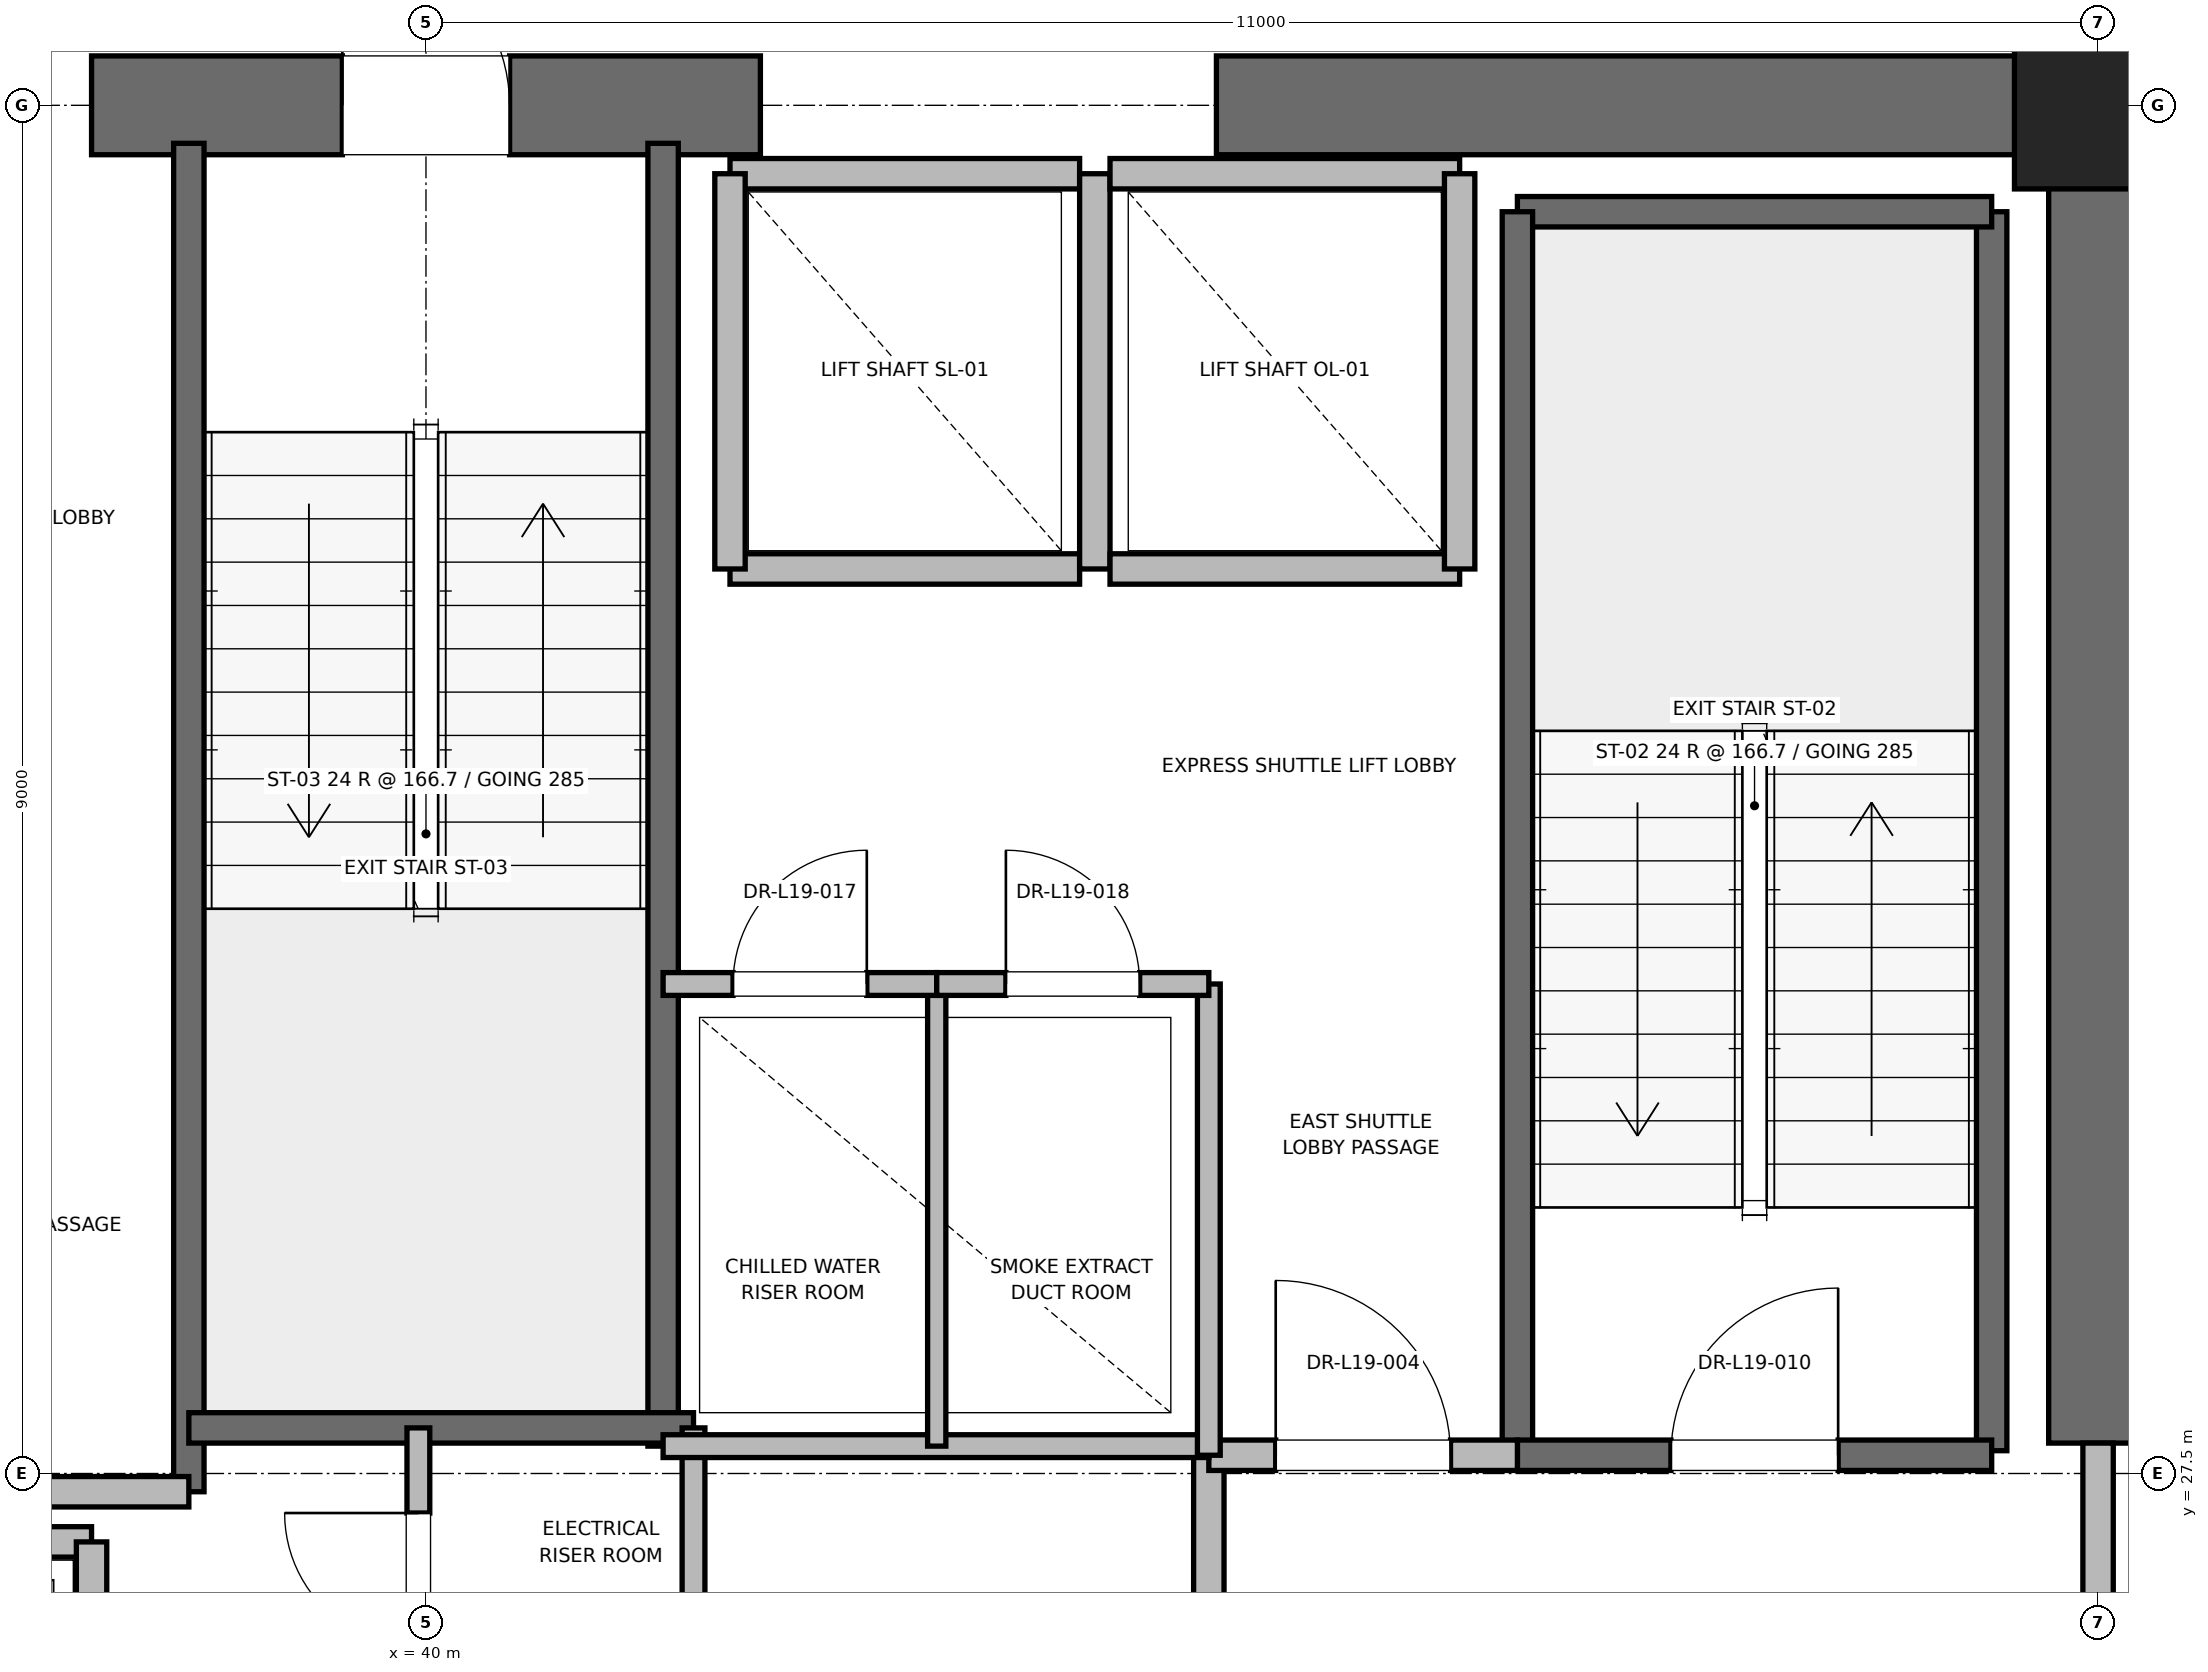
"""IFC4 building model, lengths in metres.
Left out: names, types, materials, properties, quantities, classifications, styles, units other than length and angle.
Written with IfcOpenShell. Run it as: python <this file> out.ifc"""

import sys

from ifc_helpers import new_model, si_unit, direction, frame, frame_2d, origin, origin_2d, place, context, subcontext, project, spatial, rectangle, extrude, element, fill, save


model = new_model("IFC4")
c1 = context("Model", 3, precision=1e-05, world=origin(), true_north=direction((0.0, 1.0)))
c2 = subcontext(c1, "Body", "Model", "MODEL_VIEW")
j1 = project(units=[si_unit("LENGTHUNIT", "METRE"), si_unit("PLANEANGLEUNIT", "RADIAN")], contexts=[c1])
p1 = place(None, origin())
s1 = spatial("IfcSite", under=j1, at=p1, CompositionType="ELEMENT")
p2 = place(p1, origin())
s2 = spatial("IfcBuilding", under=s1, at=p2, CompositionType="ELEMENT")
p3 = place(p2, frame((0.0, 0.0, 83.6)))
s3 = spatial("IfcBuildingStorey", under=s2, at=p3, CompositionType="ELEMENT", Elevation=83.6)
p4 = place(p3, frame((51.0, 36.5, 0.0), z_axis=(0.0, 0.0, 1.0), x_axis=(1.0, 0.0, 0.0)))
e1 = element("IfcColumn", 1, at=p4, inside=s3, PredefinedType="PILASTER", context=c2, shape_type="SweptSolid", body=[
    extrude(rectangle(XDim=1.1, YDim=1.1, at=origin_2d()), origin(), (0.0, 0.0, 1.0), 4.0),
])
p5 = place(p3, frame((37.8, 36.5, 0.0), z_axis=(0.0, 0.0, 1.0), x_axis=(1.0, 0.0, 0.0)))
e2 = element("IfcWall", 2, at=p5, inside=s3, PredefinedType="SHEAR", context=c2, shape_type="SweptSolid", body=[
    extrude(rectangle(XDim=4.4, YDim=0.65, at=frame_2d((2.2, 0.0))), origin(), (0.0, 0.0, 1.0), 3.76),
])
p6 = place(p5, frame((1.65, 0.0, 0.0)))
e3 = element("IfcOpeningElement", 3, at=p6, cuts=e2, PredefinedType="OPENING", context=c2, shape_type="SweptSolid", body=[
    extrude(rectangle(XDim=1.1, YDim=2.15, at=frame_2d((0.55, 1.075))), frame((0.0, 0.325, 0.0), z_axis=(0.0, -1.0, 0.0), x_axis=(1.0, 0.0, 0.0)), (0.0, 0.0, 1.0), 0.65),
])
p7 = place(p3, frame((45.2, 36.5, 0.0), z_axis=(0.0, 0.0, 1.0), x_axis=(1.0, 0.0, 0.0)))
e4 = element("IfcWall", 4, at=p7, inside=s3, PredefinedType="SHEAR", context=c2, shape_type="SweptSolid", body=[
    extrude(rectangle(XDim=5.8, YDim=0.65, at=frame_2d((2.9, 0.0))), origin(), (0.0, 0.0, 1.0), 3.76),
])
p8 = place(p3, frame((51.0, 27.7, 0.0), z_axis=(0.0, 0.0, 1.0), x_axis=(0.0, 1.0, 0.0)))
e5 = element("IfcWall", 5, at=p8, inside=s3, PredefinedType="SHEAR", context=c2, shape_type="SweptSolid", body=[
    extrude(rectangle(XDim=8.8, YDim=0.65, at=frame_2d((4.4, 0.0))), origin(), (0.0, 0.0, 1.0), 3.76),
])
p9 = place(p3, frame((50.3, 27.65, 0.0), z_axis=(0.0, 0.0, 1.0), x_axis=(0.0, 1.0, 0.0)))
e6 = element("IfcWall", 6, at=p9, inside=s3, PredefinedType="SOLIDWALL", context=c2, shape_type="SweptSolid", body=[
    extrude(rectangle(XDim=8.15, YDim=0.2, at=frame_2d((4.075, 0.0))), origin(), (0.0, 0.0, 1.0), 3.76),
])
p10 = place(p3, frame((47.18, 35.8, 0.0), z_axis=(0.0, 0.0, 1.0), x_axis=(1.0, 0.0, 0.0)))
e7 = element("IfcWall", 7, at=p10, inside=s3, PredefinedType="SOLIDWALL", context=c2, shape_type="SweptSolid", body=[
    extrude(rectangle(XDim=3.12, YDim=0.2, at=frame_2d((1.56, 0.0))), origin(), (0.0, 0.0, 1.0), 3.76),
])
p11 = place(p3, frame((47.18, 27.62, 0.0), z_axis=(0.0, 0.0, 1.0), x_axis=(0.0, 1.0, 0.0)))
e8 = element("IfcWall", 8, at=p11, inside=s3, PredefinedType="SOLIDWALL", context=c2, shape_type="SweptSolid", body=[
    extrude(rectangle(XDim=8.18, YDim=0.2, at=frame_2d((4.09, 0.0))), origin(), (0.0, 0.0, 1.0), 3.76),
])
p12 = place(p3, frame((47.18, 27.62, 0.0), z_axis=(0.0, 0.0, 1.0), x_axis=(1.0, 0.0, 0.0)))
e9 = element("IfcWall", 9, at=p12, inside=s3, PredefinedType="SOLIDWALL", context=c2, shape_type="SweptSolid", body=[
    extrude(rectangle(XDim=3.12, YDim=0.2, at=frame_2d((1.56, 0.0))), origin(), (0.0, 0.0, 1.0), 3.76),
])
p13 = place(p12, frame((1.01, 0.0, 0.0)))
e10 = element("IfcOpeningElement", 10, at=p13, cuts=e9, PredefinedType="OPENING", context=c2, shape_type="SweptSolid", body=[
    extrude(rectangle(XDim=1.1, YDim=2.15, at=frame_2d((0.55, 1.075))), frame((0.0, 0.1, 0.0), z_axis=(0.0, -1.0, 0.0), x_axis=(1.0, 0.0, 0.0)), (0.0, 0.0, 1.0), 0.2),
])
p14 = place(p3, frame((38.44, 27.38, 0.0), z_axis=(0.0, 0.0, 1.0), x_axis=(0.0, 1.0, 0.0)))
e11 = element("IfcWall", 11, at=p14, inside=s3, PredefinedType="SOLIDWALL", context=c2, shape_type="SweptSolid", body=[
    extrude(rectangle(XDim=8.87, YDim=0.2, at=frame_2d((4.435, 0.0))), origin(), (0.0, 0.0, 1.0), 3.76),
])
p15 = place(p3, frame((41.56, 27.68, 0.0), z_axis=(0.0, 0.0, 1.0), x_axis=(0.0, 1.0, 0.0)))
e12 = element("IfcWall", 12, at=p15, inside=s3, PredefinedType="SOLIDWALL", context=c2, shape_type="SweptSolid", body=[
    extrude(rectangle(XDim=8.57, YDim=0.2, at=frame_2d((4.285, 0.0))), origin(), (0.0, 0.0, 1.0), 3.76),
])
p16 = place(p3, frame((38.44, 27.8, 0.0), z_axis=(0.0, 0.0, 1.0), x_axis=(1.0, 0.0, 0.0)))
e13 = element("IfcWall", 13, at=p16, inside=s3, PredefinedType="SOLIDWALL", context=c2, shape_type="SweptSolid", body=[
    extrude(rectangle(XDim=3.32, YDim=0.2, at=frame_2d((1.66, 0.0))), origin(), (0.0, 0.0, 1.0), 3.76),
])
p17 = place(p3, frame((32.82, 27.38, 0.0), z_axis=(0.0, 0.0, 1.0), x_axis=(1.0, 0.0, 0.0)))
e14 = element("IfcWall", 14, at=p17, inside=s3, PredefinedType="PARTITIONING", context=c2, shape_type="SweptSolid", body=[
    extrude(rectangle(XDim=5.62, YDim=0.2, at=frame_2d((2.81, 0.0))), origin(), (0.0, 0.0, 1.0), 3.76),
])
p18 = place(p3, frame((45.15, 24.25, 0.0), z_axis=(0.0, 0.0, 1.0), x_axis=(0.0, 1.0, 0.0)))
e15 = element("IfcWall", 15, at=p18, inside=s3, PredefinedType="PARTITIONING", context=c2, shape_type="SweptSolid", body=[
    extrude(rectangle(XDim=3.37, YDim=0.2, at=frame_2d((1.685, 0.0))), origin(), (0.0, 0.0, 1.0), 3.76),
])
p19 = place(p3, frame((45.15, 27.62, 0.0), z_axis=(0.0, 0.0, 1.0), x_axis=(1.0, 0.0, 0.0)))
e16 = element("IfcWall", 16, at=p19, inside=s3, PredefinedType="PARTITIONING", context=c2, shape_type="SweptSolid", body=[
    extrude(rectangle(XDim=2.03, YDim=0.2, at=frame_2d((1.015, 0.0))), origin(), (0.0, 0.0, 1.0), 3.76),
])
p20 = place(p19, frame((0.44, 0.0, 0.0)))
e17 = element("IfcOpeningElement", 17, at=p20, cuts=e16, PredefinedType="OPENING", context=c2, shape_type="SweptSolid", body=[
    extrude(rectangle(XDim=1.15, YDim=2.2, at=frame_2d((0.575, 1.1))), frame((0.0, 0.1, 0.0), z_axis=(0.0, -1.0, 0.0), x_axis=(1.0, 0.0, 0.0)), (0.0, 0.0, 1.0), 0.2),
])
p21 = place(p3, frame((51.0, 24.3, 0.0), z_axis=(0.0, 0.0, 1.0), x_axis=(0.0, 1.0, 0.0)))
e18 = element("IfcWall", 18, at=p21, inside=s3, PredefinedType="PARTITIONING", context=c2, shape_type="SweptSolid", body=[
    extrude(rectangle(XDim=3.4, YDim=0.2, at=frame_2d((1.7, 0.0))), origin(), (0.0, 0.0, 1.0), 2.54),
])
p22 = place(p21, frame((1.125, 0.0, 0.0)))
e19 = element("IfcOpeningElement", 19, at=p22, cuts=e18, PredefinedType="OPENING", context=c2, shape_type="SweptSolid", body=[
    extrude(rectangle(XDim=1.15, YDim=2.2, at=frame_2d((0.575, 1.1))), frame((0.0, 0.1, 0.0), z_axis=(0.0, -1.0, 0.0), x_axis=(1.0, 0.0, 0.0)), (0.0, 0.0, 1.0), 0.2),
])
p23 = place(p3, frame((37.8, 27.05, 0.0), z_axis=(0.0, 0.0, 1.0), x_axis=(-1.0, 0.0, 0.0)))
e20 = element("IfcWall", 20, at=p23, inside=s3, PredefinedType="SOLIDWALL", context=c2, shape_type="SweptSolid", body=[
    extrude(rectangle(XDim=2.3, YDim=0.2, at=frame_2d((1.15, 0.0))), origin(), (0.0, 0.0, 1.0), 3.76),
])
p24 = place(p3, frame((37.8, 24.45, 0.0), z_axis=(0.0, 0.0, 1.0), x_axis=(0.0, 1.0, 0.0)))
e21 = element("IfcWall", 21, at=p24, inside=s3, PredefinedType="SOLIDWALL", context=c2, shape_type="SweptSolid", body=[
    extrude(rectangle(XDim=2.6, YDim=0.2, at=frame_2d((1.3, 0.0))), origin(), (0.0, 0.0, 1.0), 3.76),
])
p25 = place(p3, frame((42.0, 33.45, 0.0), z_axis=(0.0, 0.0, 1.0), x_axis=(1.0, 0.0, 0.0)))
e22 = element("IfcWall", 22, at=p25, inside=s3, PredefinedType="SOLIDWALL", context=c2, shape_type="SweptSolid", body=[
    extrude(rectangle(XDim=2.3, YDim=0.2, at=frame_2d((1.15, 0.0))), origin(), (0.0, 0.0, 1.0), 3.76),
])
p26 = place(p3, frame((44.3, 36.05, 0.0), z_axis=(0.0, 0.0, 1.0), x_axis=(-1.0, 0.0, 0.0)))
e23 = element("IfcWall", 23, at=p26, inside=s3, PredefinedType="SOLIDWALL", context=c2, shape_type="SweptSolid", body=[
    extrude(rectangle(XDim=2.3, YDim=0.2, at=frame_2d((1.15, 0.0))), origin(), (0.0, 0.0, 1.0), 2.54),
])
for number, where, z_axis, x_axis in (
    (24, (42.0, 36.05, 0.0), (0.0, 0.0, 1.0), (0.0, -1.0, 0.0)),
    (25, (44.4, 33.45, 0.0), (0.0, 0.0, 1.0), (0.0, 1.0, 0.0)),
):
    element("IfcWall", number, at=place(p3, frame(where, z_axis=z_axis, x_axis=x_axis)), inside=s3, PredefinedType="SOLIDWALL", context=c2, shape_type="SweptSolid", body=[
        extrude(rectangle(XDim=2.6, YDim=0.2, at=frame_2d((1.3, 0.0))), origin(), (0.0, 0.0, 1.0), 2.54),
    ])
p27 = place(p3, frame((44.5, 33.45, 0.0), z_axis=(0.0, 0.0, 1.0), x_axis=(1.0, 0.0, 0.0)))
e26 = element("IfcWall", 26, at=p27, inside=s3, PredefinedType="SOLIDWALL", context=c2, shape_type="SweptSolid", body=[
    extrude(rectangle(XDim=2.3, YDim=0.2, at=frame_2d((1.15, 0.0))), origin(), (0.0, 0.0, 1.0), 3.76),
])
p28 = place(p3, frame((46.8, 36.05, 0.0), z_axis=(0.0, 0.0, 1.0), x_axis=(-1.0, 0.0, 0.0)))
e27 = element("IfcWall", 27, at=p28, inside=s3, PredefinedType="SOLIDWALL", context=c2, shape_type="SweptSolid", body=[
    extrude(rectangle(XDim=2.3, YDim=0.2, at=frame_2d((1.15, 0.0))), origin(), (0.0, 0.0, 1.0), 2.54),
])
p29 = place(p3, frame((46.8, 33.45, 0.0), z_axis=(0.0, 0.0, 1.0), x_axis=(0.0, 1.0, 0.0)))
e28 = element("IfcWall", 28, at=p29, inside=s3, PredefinedType="SOLIDWALL", context=c2, shape_type="SweptSolid", body=[
    extrude(rectangle(XDim=2.6, YDim=0.2, at=frame_2d((1.3, 0.0))), origin(), (0.0, 0.0, 1.0), 3.76),
])
p30 = place(p3, frame((41.76, 23.8, 0.0), z_axis=(0.0, 0.0, 1.0), x_axis=(0.0, 1.0, 0.0)))
e29 = element("IfcWall", 29, at=p30, inside=s3, PredefinedType="PARTITIONING", context=c2, shape_type="SweptSolid", body=[
    extrude(rectangle(XDim=4.0, YDim=0.15, at=frame_2d((2.0, 0.0))), origin(), (0.0, 0.0, 1.0), 2.85),
])
p31 = place(p3, frame((39.95, 25.8, 0.0), z_axis=(0.0, 0.0, 1.0), x_axis=(0.0, 1.0, 0.0)))
e30 = element("IfcWall", 30, at=p31, inside=s3, PredefinedType="PARTITIONING", context=c2, shape_type="SweptSolid", body=[
    extrude(rectangle(XDim=2.0, YDim=0.15, at=frame_2d((1.0, 0.0))), origin(), (0.0, 0.0, 1.0), 2.85),
])
p32 = place(p31, frame((0.56, 0.0, 0.0)))
e31 = element("IfcOpeningElement", 31, at=p32, cuts=e30, PredefinedType="OPENING", context=c2, shape_type="SweptSolid", body=[
    extrude(rectangle(XDim=0.88, YDim=2.1, at=frame_2d((0.44, 1.05))), frame((0.0, 0.075, 0.0), z_axis=(0.0, -1.0, 0.0), x_axis=(1.0, 0.0, 0.0)), (0.0, 0.0, 1.0), 0.15),
])
p33 = place(p3, frame((41.56, 27.68, 0.0), z_axis=(0.0, 0.0, 1.0), x_axis=(1.0, 0.0, 0.0)))
e32 = element("IfcWall", 32, at=p33, inside=s3, PredefinedType="PARTITIONING", context=c2, shape_type="SweptSolid", body=[
    extrude(rectangle(XDim=3.59, YDim=0.15, at=frame_2d((1.795, 0.0))), origin(), (0.0, 0.0, 1.0), 2.85),
])
p34 = place(p3, frame((45.15, 27.62, 0.0), z_axis=(0.0, 0.0, 1.0), x_axis=(0.0, 1.0, 0.0)))
e33 = element("IfcWall", 33, at=p34, inside=s3, PredefinedType="PARTITIONING", context=c2, shape_type="SweptSolid", body=[
    extrude(rectangle(XDim=3.1, YDim=0.15, at=frame_2d((1.55, 0.0))), origin(), (0.0, 0.0, 1.0), 2.85),
])
p35 = place(p3, frame((43.36, 27.68, 0.0), z_axis=(0.0, 0.0, 1.0), x_axis=(0.0, 1.0, 0.0)))
e34 = element("IfcWall", 34, at=p35, inside=s3, PredefinedType="PARTITIONING", context=c2, shape_type="SweptSolid", body=[
    extrude(rectangle(XDim=3.04, YDim=0.12, at=frame_2d((1.52, 0.0))), origin(), (0.0, 0.0, 1.0), 2.85),
])
p36 = place(p3, frame((41.56, 30.72, 0.0), z_axis=(0.0, 0.0, 1.0), x_axis=(1.0, 0.0, 0.0)))
e35 = element("IfcWall", 35, at=p36, inside=s3, PredefinedType="PARTITIONING", context=c2, shape_type="SweptSolid", body=[
    extrude(rectangle(XDim=1.8, YDim=0.15, at=frame_2d((0.9, 0.0))), origin(), (0.0, 0.0, 1.0), 2.85),
])
p37 = place(p36, frame((0.46, 0.0, 0.0)))
e36 = element("IfcOpeningElement", 36, at=p37, cuts=e35, PredefinedType="OPENING", context=c2, shape_type="SweptSolid", body=[
    extrude(rectangle(XDim=0.88, YDim=2.1, at=frame_2d((0.44, 1.05))), frame((0.0, 0.075, 0.0), z_axis=(0.0, -1.0, 0.0), x_axis=(1.0, 0.0, 0.0)), (0.0, 0.0, 1.0), 0.15),
])
p38 = place(p3, frame((43.36, 30.72, 0.0), z_axis=(0.0, 0.0, 1.0), x_axis=(1.0, 0.0, 0.0)))
e37 = element("IfcWall", 37, at=p38, inside=s3, PredefinedType="PARTITIONING", context=c2, shape_type="SweptSolid", body=[
    extrude(rectangle(XDim=1.79, YDim=0.15, at=frame_2d((0.895, 0.0))), origin(), (0.0, 0.0, 1.0), 2.85),
])
p39 = place(p38, frame((0.455, 0.0, 0.0)))
e38 = element("IfcOpeningElement", 38, at=p39, cuts=e37, PredefinedType="OPENING", context=c2, shape_type="SweptSolid", body=[
    extrude(rectangle(XDim=0.88, YDim=2.1, at=frame_2d((0.44, 1.05))), frame((0.0, 0.075, 0.0), z_axis=(0.0, -1.0, 0.0), x_axis=(1.0, 0.0, 0.0)), (0.0, 0.0, 1.0), 0.15),
])
p40 = place(p13, origin())
e39 = element("IfcDoor", 39, at=p40, inside=s3, OperationType="SINGLE_SWING_RIGHT", PredefinedType="DOOR", context=c2, shape_type="SweptSolid", body=[
    extrude(rectangle(XDim=1.1, YDim=2.15, at=frame_2d((0.55, 1.075))), frame((0.0, 0.025, 0.0), z_axis=(0.0, -1.0, 0.0), x_axis=(1.0, 0.0, 0.0)), (0.0, 0.0, 1.0), 0.05),
])
fill(e10, e39)
p41 = place(p6, origin())
e40 = element("IfcDoor", 40, at=p41, inside=s3, OperationType="SINGLE_SWING_LEFT", PredefinedType="DOOR", context=c2, shape_type="SweptSolid", body=[
    extrude(rectangle(XDim=1.1, YDim=2.15, at=frame_2d((0.55, 1.075))), frame((0.0, 0.025, 0.0), z_axis=(0.0, -1.0, 0.0), x_axis=(1.0, 0.0, 0.0)), (0.0, 0.0, 1.0), 0.05),
])
fill(e3, e40)
p42 = place(p20, origin())
e41 = element("IfcDoor", 41, at=p42, inside=s3, OperationType="SINGLE_SWING_LEFT", PredefinedType="DOOR", context=c2, shape_type="SweptSolid", body=[
    extrude(rectangle(XDim=1.15, YDim=2.2, at=frame_2d((0.575, 1.1))), frame((0.0, 0.025, 0.0), z_axis=(0.0, -1.0, 0.0), x_axis=(1.0, 0.0, 0.0)), (0.0, 0.0, 1.0), 0.05),
])
fill(e17, e41)
p43 = place(p32, origin())
e42 = element("IfcDoor", 42, at=p43, inside=s3, OperationType="SINGLE_SWING_RIGHT", PredefinedType="DOOR", context=c2, shape_type="SweptSolid", body=[
    extrude(rectangle(XDim=0.88, YDim=2.1, at=frame_2d((0.44, 1.05))), frame((0.0, 0.025, 0.0), z_axis=(0.0, -1.0, 0.0), x_axis=(1.0, 0.0, 0.0)), (0.0, 0.0, 1.0), 0.05),
])
fill(e31, e42)
p44 = place(p37, origin())
e43 = element("IfcDoor", 43, at=p44, inside=s3, OperationType="SINGLE_SWING_RIGHT", PredefinedType="DOOR", context=c2, shape_type="SweptSolid", body=[
    extrude(rectangle(XDim=0.88, YDim=2.1, at=frame_2d((0.44, 1.05))), frame((0.0, 0.025, 0.0), z_axis=(0.0, -1.0, 0.0), x_axis=(1.0, 0.0, 0.0)), (0.0, 0.0, 1.0), 0.05),
])
fill(e36, e43)
p45 = place(p39, origin())
e44 = element("IfcDoor", 44, at=p45, inside=s3, OperationType="SINGLE_SWING_LEFT", PredefinedType="DOOR", context=c2, shape_type="SweptSolid", body=[
    extrude(rectangle(XDim=0.88, YDim=2.1, at=frame_2d((0.44, 1.05))), frame((0.0, 0.025, 0.0), z_axis=(0.0, -1.0, 0.0), x_axis=(1.0, 0.0, 0.0)), (0.0, 0.0, 1.0), 0.05),
])
fill(e38, e44)
save(model, sys.argv[1])
